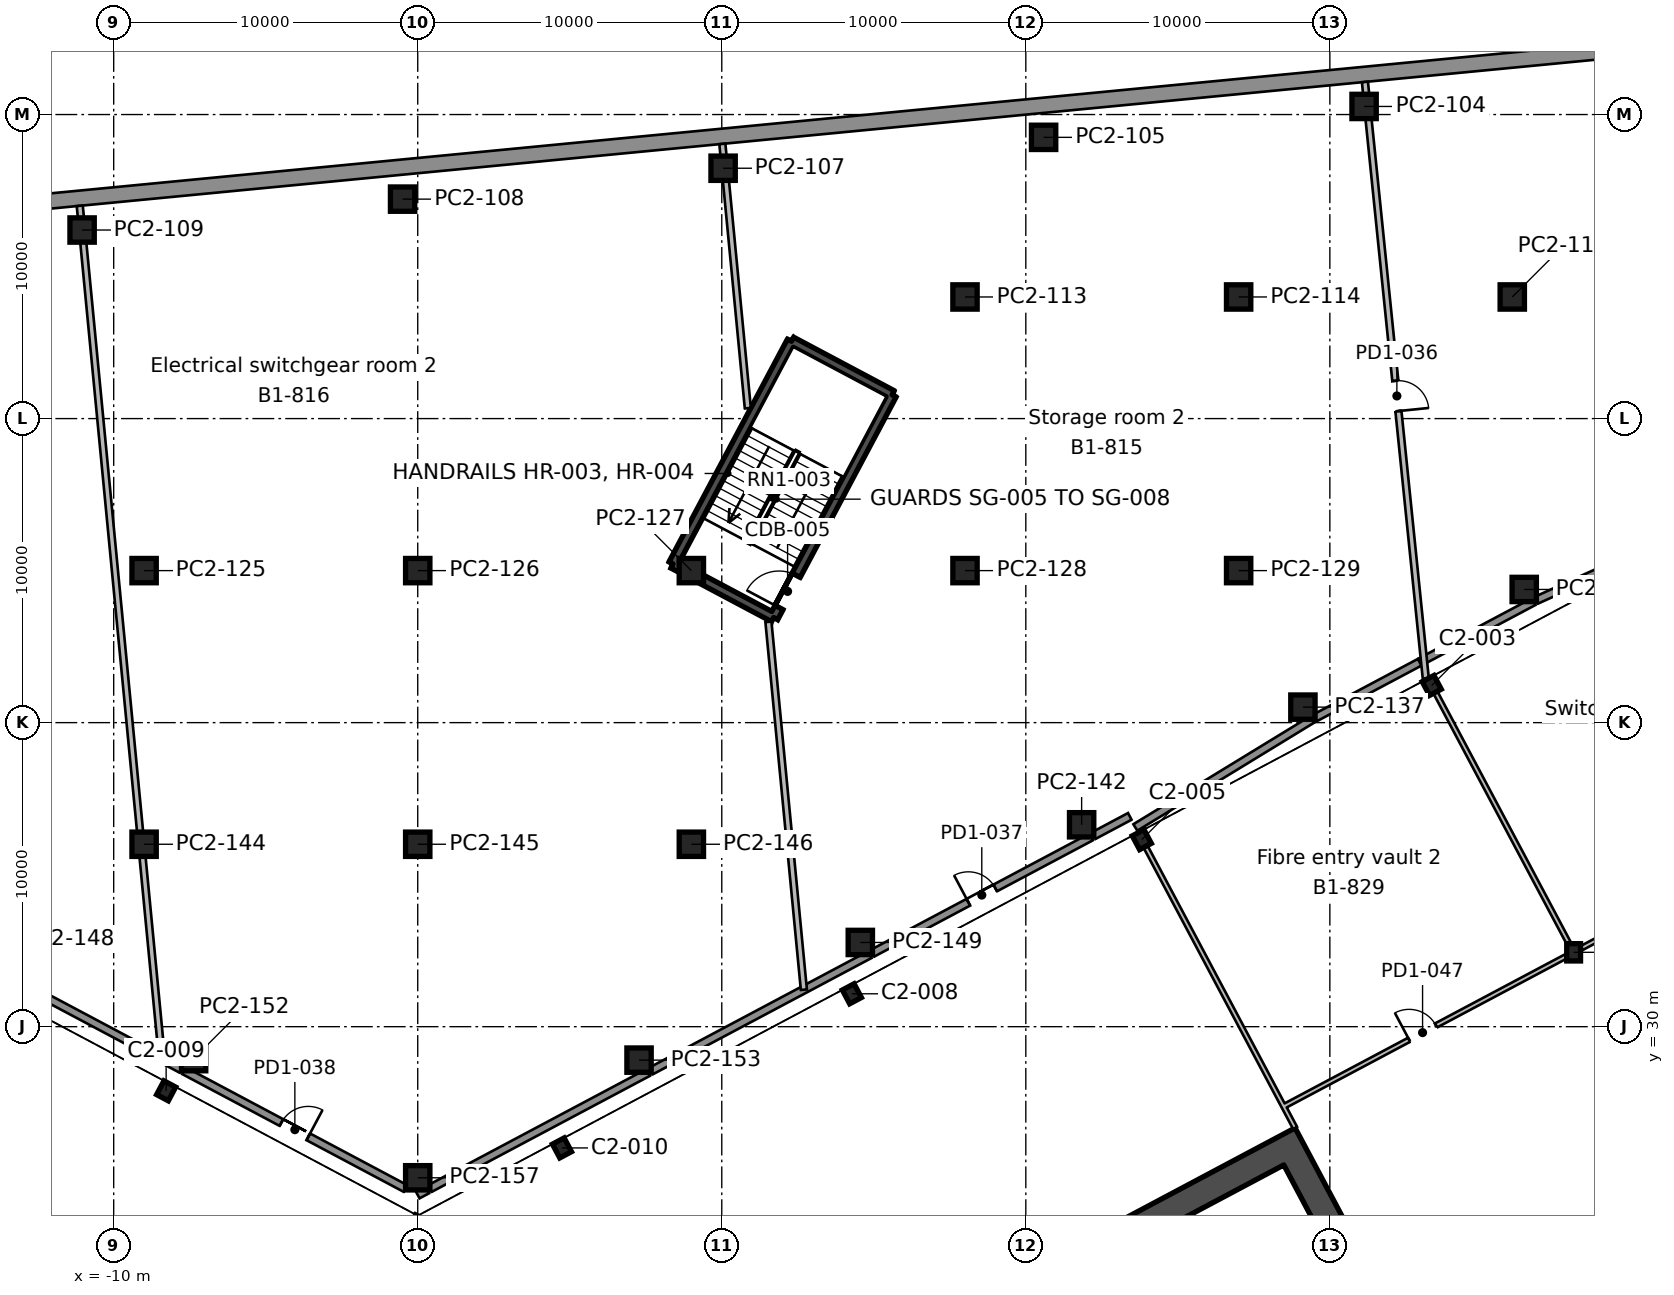
"""IFC4 building model, lengths in metres.
Left out: names, types, materials, properties, quantities, classifications, styles, units other than length and angle.
Written with IfcOpenShell. Run it as: python <this file> out.ifc"""

import sys

from ifc_helpers import new_model, si_unit, direction, frame, frame_2d, origin, origin_2d, place, context, subcontext, project, spatial, rectangle, i_section, extrude, element, fill, save


model = new_model("IFC4")
c1 = context("Model", 3, precision=1e-05, world=origin(), true_north=direction((0.0, 1.0)))
c2 = subcontext(c1, "Body", "Model", "MODEL_VIEW")
j1 = project(units=[si_unit("LENGTHUNIT", "METRE"), si_unit("PLANEANGLEUNIT", "RADIAN")], contexts=[c1])
p1 = place(None, origin())
s1 = spatial("IfcSite", under=j1, at=p1, CompositionType="ELEMENT")
p2 = place(p1, origin())
s2 = spatial("IfcBuilding", under=s1, at=p2, CompositionType="ELEMENT")
p3 = place(p2, frame((0.0, 0.0, -4.5)))
s3 = spatial("IfcBuildingStorey", under=s2, at=p3, CompositionType="ELEMENT", Elevation=-4.5)
for number, where, z_axis, x_axis in (
    (1, (4.744, 26.012, 0.0), (0.0, 0.0, 1.0), (-0.883, -0.469, 0.0)),
    (2, (-8.275, 27.89, 0.0), (0.0, 0.0, 1.0), (-0.883, 0.469, 0.0)),
    (3, (14.279, 31.082, 0.0), (0.0, 0.0, 1.0), (-0.883, -0.469, 0.0)),
):
    element("IfcColumn", number, at=place(p3, frame(where, z_axis=z_axis, x_axis=x_axis)), inside=s3, PredefinedType="COLUMN", context=c2, shape_type="SweptSolid", body=[
        extrude(i_section(OverallWidth=0.437, OverallDepth=0.513, WebThickness=0.061, FlangeThickness=0.097, FilletRadius=0.015, at=origin_2d()), origin(), (0.0, 0.0, 1.0), 4.5),
    ])
p4 = place(p3, frame((38.018, 32.446, 0.0), z_axis=(0.0, 0.0, 1.0), x_axis=(1.0, 0.0, 0.0)))
e4 = element("IfcColumn", 4, at=p4, inside=s3, PredefinedType="COLUMN", context=c2, shape_type="SweptSolid", body=[
    extrude(i_section(OverallWidth=0.455, OverallDepth=0.569, WebThickness=0.078, FlangeThickness=0.125, FilletRadius=0.015, at=origin_2d()), origin(), (0.0, 0.0, 1.0), 4.5),
])
for number, where, z_axis, x_axis in (
    (5, (23.815, 36.152, 0.0), (0.0, 0.0, 1.0), (-0.883, -0.469, 0.0)),
    (6, (33.351, 41.223, 0.0), (0.0, 0.0, 1.0), (-0.883, -0.469, 0.0)),
):
    element("IfcColumn", number, at=place(p3, frame(where, z_axis=z_axis, x_axis=x_axis)), inside=s3, PredefinedType="COLUMN", context=c2, shape_type="SweptSolid", body=[
        extrude(i_section(OverallWidth=0.437, OverallDepth=0.513, WebThickness=0.061, FlangeThickness=0.097, FilletRadius=0.015, at=origin_2d()), origin(), (0.0, 0.0, 1.0), 4.5),
    ])
p5 = place(p3, frame((37.849, 8.799, 0.0), z_axis=(0.0, 0.0, 1.0), x_axis=(-0.469465789982, 0.882950662289, 0.0)))
e7 = element("IfcWall", 7, at=p5, inside=s3, PredefinedType="SHEAR", context=c2, shape_type="SweptSolid", body=[
    extrude(rectangle(XDim=20.0, YDim=0.9, at=frame_2d((10.0, 0.0))), origin(), (0.0, 0.0, 1.0), 4.5),
])
p6 = place(p5, frame((10.6, 0.0, 0.0)))
e8 = element("IfcOpeningElement", 8, at=p6, cuts=e7, PredefinedType="OPENING", context=c2, shape_type="SweptSolid", body=[
    extrude(rectangle(XDim=2.4, YDim=2.4, at=frame_2d((1.2, 1.2))), frame((0.0, 0.46, 0.0), z_axis=(0.0, -1.0, 0.0), x_axis=(1.0, 0.0, 0.0)), (0.0, 0.0, 1.0), 0.92),
])
p7 = place(p3, frame((10.438, 16.366, 0.0), z_axis=(0.0, 0.0, 1.0), x_axis=(0.88294509198, 0.469476266226, 0.0)))
e9 = element("IfcWall", 9, at=p7, inside=s3, PredefinedType="SHEAR", context=c2, shape_type="SweptSolid", body=[
    extrude(rectangle(XDim=20.2, YDim=0.9, at=frame_2d((10.1, 0.0))), origin(), (0.0, 0.0, 1.0), 4.5),
])
p8 = place(p3, frame((12.293, 52.544, 0.0), z_axis=(0.0, 0.0, 1.0), x_axis=(0.882948761726, -0.46946936446, 0.0)))
e10 = element("IfcWall", 10, at=p8, inside=s3, PredefinedType="SHEAR", context=c2, shape_type="SweptSolid", body=[
    extrude(rectangle(XDim=3.75, YDim=0.3, at=frame_2d((1.875, 0.0))), origin(), (0.0, 0.0, 1.0), 4.5),
])
p9 = place(p3, frame((15.604, 50.784, 0.0), z_axis=(0.0, 0.0, 1.0), x_axis=(-0.469464178475, -0.882951519127, 0.0)))
e11 = element("IfcWall", 11, at=p9, inside=s3, PredefinedType="SHEAR", context=c2, shape_type="SweptSolid", body=[
    extrude(rectangle(XDim=8.3, YDim=0.3, at=frame_2d((4.15, 0.0))), origin(), (0.0, 0.0, 1.0), 4.5),
])
p10 = place(p9, frame((6.725, 0.0, 0.0)))
e12 = element("IfcOpeningElement", 12, at=p10, cuts=e11, PredefinedType="OPENING", context=c2, shape_type="SweptSolid", body=[
    extrude(rectangle(XDim=1.2, YDim=2.1, at=frame_2d((0.6, 1.05))), frame((0.0, 0.16, 0.0), z_axis=(0.0, -1.0, 0.0), x_axis=(1.0, 0.0, 0.0)), (0.0, 0.0, 1.0), 0.32),
])
p11 = place(p3, frame((11.707, 43.456, 0.0), z_axis=(0.0, 0.0, 1.0), x_axis=(-0.882948761726, 0.46946936446, 0.0)))
e13 = element("IfcWall", 13, at=p11, inside=s3, PredefinedType="SHEAR", context=c2, shape_type="SweptSolid", body=[
    extrude(rectangle(XDim=3.75, YDim=0.3, at=frame_2d((1.875, 0.0))), origin(), (0.0, 0.0, 1.0), 4.5),
])
p12 = place(p3, frame((8.396, 45.216, 0.0), z_axis=(0.0, 0.0, 1.0), x_axis=(0.469464178475, 0.882951519127, 0.0)))
e14 = element("IfcWall", 14, at=p12, inside=s3, PredefinedType="SHEAR", context=c2, shape_type="SweptSolid", body=[
    extrude(rectangle(XDim=8.3, YDim=0.3, at=frame_2d((4.15, 0.0))), origin(), (0.0, 0.0, 1.0), 4.5),
])
p13 = place(p3, frame((52.315, 63.363, 0.0), z_axis=(0.0, 0.0, 1.0), x_axis=(-0.995387233017, -0.095938815644, 0.0)))
e15 = element("IfcWall", 15, at=p13, inside=s3, PredefinedType="SOLIDWALL", context=c2, shape_type="SweptSolid", body=[
    extrude(rectangle(XDim=95.624, YDim=0.5, at=frame_2d((47.812, 0.0))), origin(), (0.0, 0.0, 1.0), 4.5),
])
for number, where, z_axis, x_axis in (
    (16, (0.0, 25.03, 0.0), (0.0, 0.0, 1.0), (1.0, 0.0, 0.0)),
    (17, (7.279, 28.9, 0.0), (0.0, 0.0, 1.0), (1.0, 0.0, 0.0)),
    (18, (-7.371, 28.949, 0.0), (0.0, 0.0, 1.0), (1.0, 0.0, 0.0)),
    (19, (14.557, 32.77, 0.0), (0.0, 0.0, 1.0), (1.0, 0.0, 0.0)),
    (20, (-9.0, 36.0, 0.0), (0.0, 0.0, 1.0), (1.0, 0.0, 0.0)),
    (21, (0.0, 36.0, 0.0), (0.0, 0.0, 1.0), (1.0, 0.0, 0.0)),
    (22, (9.0, 36.0, 0.0), (0.0, 0.0, 1.0), (1.0, 0.0, 0.0)),
    (23, (21.836, 36.64, 0.0), (0.0, 0.0, 1.0), (1.0, 0.0, 0.0)),
    (24, (29.114, 40.51, 0.0), (0.0, 0.0, 1.0), (1.0, 0.0, 0.0)),
    (25, (36.393, 44.38, 0.0), (0.0, 0.0, 1.0), (1.0, 0.0, 0.0)),
    (26, (-9.0, 45.0, 0.0), (0.0, 0.0, 1.0), (1.0, 0.0, 0.0)),
    (27, (0.0, 45.0, 0.0), (0.0, 0.0, 1.0), (1.0, 0.0, 0.0)),
    (28, (9.0, 45.0, 0.0), (0.0, 0.0, 1.0), (1.0, 0.0, 0.0)),
    (29, (18.0, 45.0, 0.0), (0.0, 0.0, 1.0), (1.0, 0.0, 0.0)),
    (30, (27.0, 45.0, 0.0), (0.0, 0.0, 1.0), (1.0, 0.0, 0.0)),
    (31, (18.0, 54.0, 0.0), (0.0, 0.0, 1.0), (1.0, 0.0, 0.0)),
    (32, (27.0, 54.0, 0.0), (0.0, 0.0, 1.0), (1.0, 0.0, 0.0)),
    (33, (36.0, 54.0, 0.0), (0.0, 0.0, 1.0), (1.0, 0.0, 0.0)),
    (34, (-11.039, 56.202, 0.0), (0.0, 0.0, 1.0), (1.0, 0.0, 0.0)),
    (35, (-0.498, 57.218, 0.0), (0.0, 0.0, 1.0), (1.0, 0.0, 0.0)),
    (36, (10.044, 58.234, 0.0), (0.0, 0.0, 1.0), (1.0, 0.0, 0.0)),
    (37, (20.585, 59.25, 0.0), (0.0, 0.0, 1.0), (1.0, 0.0, 0.0)),
    (38, (31.126, 60.266, 0.0), (0.0, 0.0, 1.0), (1.0, 0.0, 0.0)),
):
    element("IfcColumn", number, at=place(p3, frame(where, z_axis=z_axis, x_axis=x_axis)), inside=s3, PredefinedType="COLUMN", context=c2, shape_type="SweptSolid", body=[
        extrude(rectangle(XDim=0.8, YDim=0.8, at=origin_2d()), origin(), (0.0, 0.0, 1.0), 4.05),
    ])
p14 = place(p3, frame((31.155, 61.072, 0.0), z_axis=(0.0, 0.0, 1.0), x_axis=(0.095769432991, -0.995403544149, 0.0)))
e39 = element("IfcWall", 39, at=p14, inside=s3, PredefinedType="PARTITIONING", context=c2, shape_type="SweptSolid", body=[
    extrude(rectangle(XDim=0.408, YDim=0.2, at=frame_2d((0.204, 0.0))), origin(), (0.0, 0.0, 1.0), 4.05),
])
p15 = place(p3, frame((31.271, 59.866, 0.0), z_axis=(0.0, 0.0, 1.0), x_axis=(0.10182537806, -0.994802288087, 0.0)))
e40 = element("IfcWall", 40, at=p15, inside=s3, PredefinedType="PARTITIONING", context=c2, shape_type="SweptSolid", body=[
    extrude(rectangle(XDim=18.51, YDim=0.2, at=frame_2d((9.255, 0.0))), origin(), (0.0, 0.0, 1.0), 4.05),
])
p16 = place(p15, frame((8.669, 0.0, 0.0)))
e41 = element("IfcOpeningElement", 41, at=p16, cuts=e40, PredefinedType="OPENING", context=c2, shape_type="SweptSolid", body=[
    extrude(rectangle(XDim=1.0, YDim=2.1, at=frame_2d((0.5, 1.05))), frame((0.0, 0.11, 0.0), z_axis=(0.0, -1.0, 0.0), x_axis=(1.0, 0.0, 0.0)), (0.0, 0.0, 1.0), 0.22),
])
p17 = place(p3, frame((32.989, 42.004, 0.0), z_axis=(0.0, 0.0, 1.0), x_axis=(0.882952706143, 0.469461945971, 0.0)))
e42 = element("IfcWall", 42, at=p17, inside=s3, PredefinedType="SOLIDWALL", context=c2, shape_type="SweptSolid", body=[
    extrude(rectangle(XDim=4.209, YDim=0.25, at=frame_2d((2.104, 0.0))), origin(), (0.0, 0.0, 1.0), 4.05),
])
p18 = place(p3, frame((36.793, 44.027, 0.0), z_axis=(0.0, 0.0, 1.0), x_axis=(0.910758391685, 0.412939646892, 0.0)))
e43 = element("IfcWall", 43, at=p18, inside=s3, PredefinedType="SOLIDWALL", context=c2, shape_type="SweptSolid", body=[
    extrude(rectangle(XDim=6.457, YDim=0.25, at=frame_2d((3.229, 0.0))), origin(), (0.0, 0.0, 1.0), 4.05),
])
p19 = place(p3, frame((10.019, 59.035, 0.0), z_axis=(0.0, 0.0, 1.0), x_axis=(0.095781713328, -0.995402362561, 0.0)))
e44 = element("IfcWall", 44, at=p19, inside=s3, PredefinedType="PARTITIONING", context=c2, shape_type="SweptSolid", body=[
    extrude(rectangle(XDim=0.403, YDim=0.2, at=frame_2d((0.201, 0.0))), origin(), (0.0, 0.0, 1.0), 4.05),
])
p20 = place(p3, frame((10.135, 57.834, 0.0), z_axis=(0.0, 0.0, 1.0), x_axis=(0.095941692949, -0.995386955688, 0.0)))
e45 = element("IfcWall", 45, at=p20, inside=s3, PredefinedType="PARTITIONING", context=c2, shape_type="SweptSolid", body=[
    extrude(rectangle(XDim=7.527, YDim=0.2, at=frame_2d((3.764, 0.0))), origin(), (0.0, 0.0, 1.0), 4.05),
])
p21 = place(p3, frame((11.534, 43.315, 0.0), z_axis=(0.0, 0.0, 1.0), x_axis=(0.095933245663, -0.995387769855, 0.0)))
e46 = element("IfcWall", 46, at=p21, inside=s3, PredefinedType="PARTITIONING", context=c2, shape_type="SweptSolid", body=[
    extrude(rectangle(XDim=12.155, YDim=0.2, at=frame_2d((6.077, 0.0))), origin(), (0.0, 0.0, 1.0), 4.05),
])
p22 = place(p3, frame((23.603, 36.552, 0.0), z_axis=(0.0, 0.0, 1.0), x_axis=(0.853356100333, 0.521328462703, 0.0)))
e47 = element("IfcWall", 47, at=p22, inside=s3, PredefinedType="SOLIDWALL", context=c2, shape_type="SweptSolid", body=[
    extrude(rectangle(XDim=6.825, YDim=0.25, at=frame_2d((3.413, 0.0))), origin(), (0.0, 0.0, 1.0), 4.05),
])
p23 = place(p3, frame((29.514, 40.156, 0.0), z_axis=(0.0, 0.0, 1.0), x_axis=(0.882952549127, 0.469462241283, 0.0)))
e48 = element("IfcWall", 48, at=p23, inside=s3, PredefinedType="SOLIDWALL", context=c2, shape_type="SweptSolid", body=[
    extrude(rectangle(XDim=3.895, YDim=0.25, at=frame_2d((1.948, 0.0))), origin(), (0.0, 0.0, 1.0), 4.05),
])
p24 = place(p3, frame((12.706, 31.219, 0.0), z_axis=(0.0, 0.0, 1.0), x_axis=(0.882909290673, 0.469543591633, 0.0)))
e49 = element("IfcWall", 49, at=p24, inside=s3, PredefinedType="SOLIDWALL", context=c2, shape_type="SweptSolid", body=[
    extrude(rectangle(XDim=2.451, YDim=0.25, at=frame_2d((1.226, 0.0))), origin(), (0.0, 0.0, 1.0), 4.05),
])
p25 = place(p3, frame((14.957, 32.416, 0.0), z_axis=(0.0, 0.0, 1.0), x_axis=(0.882948003129, 0.46947079118, 0.0)))
e50 = element("IfcWall", 50, at=p25, inside=s3, PredefinedType="SOLIDWALL", context=c2, shape_type="SweptSolid", body=[
    extrude(rectangle(XDim=8.145, YDim=0.25, at=frame_2d((4.072, 0.0))), origin(), (0.0, 0.0, 1.0), 4.05),
])
p26 = place(p25, frame((3.572, 0.0, 0.0)))
e51 = element("IfcOpeningElement", 51, at=p26, cuts=e50, PredefinedType="OPENING", context=c2, shape_type="SweptSolid", body=[
    extrude(rectangle(XDim=1.0, YDim=2.1, at=frame_2d((0.5, 1.05))), frame((0.0, 0.135, 0.0), z_axis=(0.0, -1.0, 0.0), x_axis=(1.0, 0.0, 0.0)), (0.0, 0.0, 1.0), 0.27),
])
p27 = place(p3, frame((22.236, 36.287, 0.0), z_axis=(0.0, 0.0, 1.0), x_axis=(0.882931801402, 0.469501260993, 0.0)))
e52 = element("IfcWall", 52, at=p27, inside=s3, PredefinedType="SOLIDWALL", context=c2, shape_type="SweptSolid", body=[
    extrude(rectangle(XDim=1.341, YDim=0.25, at=frame_2d((0.67, 0.0))), origin(), (0.0, 0.0, 1.0), 4.05),
])
p28 = place(p3, frame((-11.116, 56.998, 0.0), z_axis=(0.0, 0.0, 1.0), x_axis=(0.095794311802, -0.995401150203, 0.0)))
e53 = element("IfcWall", 53, at=p28, inside=s3, PredefinedType="PARTITIONING", context=c2, shape_type="SweptSolid", body=[
    extrude(rectangle(XDim=0.397, YDim=0.2, at=frame_2d((0.199, 0.0))), origin(), (0.0, 0.0, 1.0), 4.05),
])
p29 = place(p3, frame((-11.001, 55.802, 0.0), z_axis=(0.0, 0.0, 1.0), x_axis=(0.095942712783, -0.99538685739, 0.0)))
e54 = element("IfcWall", 54, at=p29, inside=s3, PredefinedType="PARTITIONING", context=c2, shape_type="SweptSolid", body=[
    extrude(rectangle(XDim=19.492, YDim=0.2, at=frame_2d((9.746, 0.0))), origin(), (0.0, 0.0, 1.0), 4.05),
])
p30 = place(p3, frame((-9.054, 35.6, 0.0), z_axis=(0.0, 0.0, 1.0), x_axis=(0.095939612703, -0.995387156193, 0.0)))
e55 = element("IfcWall", 55, at=p30, inside=s3, PredefinedType="PARTITIONING", context=c2, shape_type="SweptSolid", body=[
    extrude(rectangle(XDim=6.695, YDim=0.2, at=frame_2d((3.348, 0.0))), origin(), (0.0, 0.0, 1.0), 4.05),
])
p31 = place(p3, frame((-8.407, 28.933, 0.0), z_axis=(0.0, 0.0, 1.0), x_axis=(0.88302789325, -0.469320508547, 0.0)))
e56 = element("IfcWall", 56, at=p31, inside=s3, PredefinedType="SOLIDWALL", context=c2, shape_type="SweptSolid", body=[
    extrude(rectangle(XDim=0.72, YDim=0.25, at=frame_2d((0.36, 0.0))), origin(), (0.0, 0.0, 1.0), 4.05),
])
p32 = place(p3, frame((-7.684, 28.549, 0.0), z_axis=(0.0, 0.0, 1.0), x_axis=(0.882947828207, -0.46947112016, 0.0)))
e57 = element("IfcWall", 57, at=p32, inside=s3, PredefinedType="SOLIDWALL", context=c2, shape_type="SweptSolid", body=[
    extrude(rectangle(XDim=8.249, YDim=0.25, at=frame_2d((4.125, 0.0))), origin(), (0.0, 0.0, 1.0), 4.05),
])
p33 = place(p32, frame((3.625, 0.0, 0.0)))
e58 = element("IfcOpeningElement", 58, at=p33, cuts=e57, PredefinedType="OPENING", context=c2, shape_type="SweptSolid", body=[
    extrude(rectangle(XDim=1.0, YDim=2.1, at=frame_2d((0.5, 1.05))), frame((0.0, 0.135, 0.0), z_axis=(0.0, -1.0, 0.0), x_axis=(1.0, 0.0, 0.0)), (0.0, 0.0, 1.0), 0.27),
])
p34 = place(p3, frame((0.0, 24.463, 0.0), z_axis=(0.0, 0.0, 1.0), x_axis=(0.882848088474, 0.469658655491, 0.0)))
e59 = element("IfcWall", 59, at=p34, inside=s3, PredefinedType="SOLIDWALL", context=c2, shape_type="SweptSolid", body=[
    extrude(rectangle(XDim=0.354, YDim=0.25, at=frame_2d((0.177, 0.0))), origin(), (0.0, 0.0, 1.0), 4.05),
])
p35 = place(p3, frame((0.4, 24.676, 0.0), z_axis=(0.0, 0.0, 1.0), x_axis=(0.882954609474, 0.469458366214, 0.0)))
e60 = element("IfcWall", 60, at=p35, inside=s3, PredefinedType="SOLIDWALL", context=c2, shape_type="SweptSolid", body=[
    extrude(rectangle(XDim=8.145, YDim=0.25, at=frame_2d((4.073, 0.0))), origin(), (0.0, 0.0, 1.0), 4.05),
])
p36 = place(p3, frame((7.679, 28.546, 0.0), z_axis=(0.0, 0.0, 1.0), x_axis=(0.882942382041, 0.469481362779, 0.0)))
e61 = element("IfcWall", 61, at=p36, inside=s3, PredefinedType="SOLIDWALL", context=c2, shape_type="SweptSolid", body=[
    extrude(rectangle(XDim=5.692, YDim=0.25, at=frame_2d((2.846, 0.0))), origin(), (0.0, 0.0, 1.0), 4.05),
])
p37 = place(p3, frame((-15.056, 32.469, 0.0), z_axis=(0.0, 0.0, 1.0), x_axis=(0.882954463929, -0.469458639954, 0.0)))
e62 = element("IfcWall", 62, at=p37, inside=s3, PredefinedType="SOLIDWALL", context=c2, shape_type="SweptSolid", body=[
    extrude(rectangle(XDim=7.53, YDim=0.25, at=frame_2d((3.765, 0.0))), origin(), (0.0, 0.0, 1.0), 4.05),
])
p38 = place(p3, frame((37.755, 32.307, 0.0), z_axis=(0.0, 0.0, 1.0), x_axis=(-0.882947426762, -0.469471875169, 0.0)))
e63 = element("IfcWall", 63, at=p38, inside=s3, PredefinedType="PARTITIONING", context=c2, shape_type="SweptSolid", body=[
    extrude(rectangle(XDim=10.503, YDim=0.15, at=frame_2d((5.251, 0.0))), origin(), (0.0, 0.0, 1.0), 4.05),
])
p39 = place(p38, frame((4.83, 0.0, 0.0)))
e64 = element("IfcOpeningElement", 64, at=p39, cuts=e63, PredefinedType="OPENING", context=c2, shape_type="SweptSolid", body=[
    extrude(rectangle(XDim=1.0, YDim=2.1, at=frame_2d((0.5, 1.05))), frame((0.0, 0.085, 0.0), z_axis=(0.0, -1.0, 0.0), x_axis=(1.0, 0.0, 0.0)), (0.0, 0.0, 1.0), 0.17),
])
p40 = place(p3, frame((47.291, 37.376, 0.0), z_axis=(0.0, 0.0, 1.0), x_axis=(-0.88295489766, -0.469457824194, 0.0)))
e65 = element("IfcWall", 65, at=p40, inside=s3, PredefinedType="PARTITIONING", context=c2, shape_type="SweptSolid", body=[
    extrude(rectangle(XDim=10.204, YDim=0.15, at=frame_2d((5.102, 0.0))), origin(), (0.0, 0.0, 1.0), 4.05),
])
p41 = place(p40, frame((4.602, 0.0, 0.0)))
e66 = element("IfcOpeningElement", 66, at=p41, cuts=e65, PredefinedType="OPENING", context=c2, shape_type="SweptSolid", body=[
    extrude(rectangle(XDim=1.0, YDim=2.1, at=frame_2d((0.5, 1.05))), frame((0.0, 0.085, 0.0), z_axis=(0.0, -1.0, 0.0), x_axis=(1.0, 0.0, 0.0)), (0.0, 0.0, 1.0), 0.17),
])
p42 = place(p3, frame((28.485, 27.371, 0.0), z_axis=(0.0, 0.0, 1.0), x_axis=(0.469454908155, -0.882956448082, 0.0)))
e67 = element("IfcWall", 67, at=p42, inside=s3, PredefinedType="PARTITIONING", context=c2, shape_type="SweptSolid", body=[
    extrude(rectangle(XDim=0.794, YDim=0.15, at=frame_2d((0.397, 0.0))), origin(), (0.0, 0.0, 1.0), 4.05),
])
p43 = place(p3, frame((37.85, 32.762, 0.0), z_axis=(0.0, 0.0, 1.0), x_axis=(-0.469481854544, 0.882942120557, 0.0)))
e68 = element("IfcWall", 68, at=p43, inside=s3, PredefinedType="PARTITIONING", context=c2, shape_type="SweptSolid", body=[
    extrude(rectangle(XDim=9.326, YDim=0.15, at=frame_2d((4.663, 0.0))), origin(), (0.0, 0.0, 1.0), 4.05),
])
p44 = place(p3, frame((23.936, 35.926, 0.0), z_axis=(0.0, 0.0, 1.0), x_axis=(0.469473365889, -0.882946634129, 0.0)))
e69 = element("IfcWall", 69, at=p44, inside=s3, PredefinedType="PARTITIONING", context=c2, shape_type="SweptSolid", body=[
    extrude(rectangle(XDim=9.687, YDim=0.15, at=frame_2d((4.844, 0.0))), origin(), (0.0, 0.0, 1.0), 4.05),
])
p45 = place(p10, frame((1.2, 0.0, 0.0), z_axis=(0.0, 0.0, 1.0), x_axis=(-1.0, 0.0, 0.0)))
e70 = element("IfcDoor", 70, at=p45, inside=s3, OperationType="SINGLE_SWING_LEFT", PredefinedType="DOOR", context=c2, shape_type="SweptSolid", body=[
    extrude(rectangle(XDim=1.2, YDim=2.1, at=frame_2d((0.6, 1.05))), frame((0.0, 0.025, 0.0), z_axis=(0.0, -1.0, 0.0), x_axis=(1.0, 0.0, 0.0)), (0.0, 0.0, 1.0), 0.05),
])
fill(e12, e70)
p46 = place(p39, frame((1.0, 0.0, 0.0), z_axis=(0.0, 0.0, 1.0), x_axis=(-1.0, 0.0, 0.0)))
e71 = element("IfcDoor", 71, at=p46, inside=s3, OperationType="SINGLE_SWING_LEFT", PredefinedType="DOOR", context=c2, shape_type="SweptSolid", body=[
    extrude(rectangle(XDim=1.0, YDim=2.1, at=frame_2d((0.5, 1.05))), frame((0.0, 0.025, 0.0), z_axis=(0.0, -1.0, 0.0), x_axis=(1.0, 0.0, 0.0)), (0.0, 0.0, 1.0), 0.05),
])
fill(e64, e71)
p47 = place(p33, origin())
e72 = element("IfcDoor", 72, at=p47, inside=s3, OperationType="SINGLE_SWING_RIGHT", PredefinedType="DOOR", context=c2, shape_type="SweptSolid", body=[
    extrude(rectangle(XDim=1.0, YDim=2.1, at=frame_2d((0.5, 1.05))), frame((0.0, 0.025, 0.0), z_axis=(0.0, -1.0, 0.0), x_axis=(1.0, 0.0, 0.0)), (0.0, 0.0, 1.0), 0.05),
])
fill(e58, e72)
p48 = place(p26, origin())
e73 = element("IfcDoor", 73, at=p48, inside=s3, OperationType="SINGLE_SWING_LEFT", PredefinedType="DOOR", context=c2, shape_type="SweptSolid", body=[
    extrude(rectangle(XDim=1.0, YDim=2.1, at=frame_2d((0.5, 1.05))), frame((0.0, 0.025, 0.0), z_axis=(0.0, -1.0, 0.0), x_axis=(1.0, 0.0, 0.0)), (0.0, 0.0, 1.0), 0.05),
])
fill(e51, e73)
p49 = place(p16, origin())
e74 = element("IfcDoor", 74, at=p49, inside=s3, OperationType="SINGLE_SWING_RIGHT", PredefinedType="DOOR", context=c2, shape_type="SweptSolid", body=[
    extrude(rectangle(XDim=1.0, YDim=2.1, at=frame_2d((0.5, 1.05))), frame((0.0, 0.025, 0.0), z_axis=(0.0, -1.0, 0.0), x_axis=(1.0, 0.0, 0.0)), (0.0, 0.0, 1.0), 0.05),
])
fill(e41, e74)
save(model, sys.argv[1])
